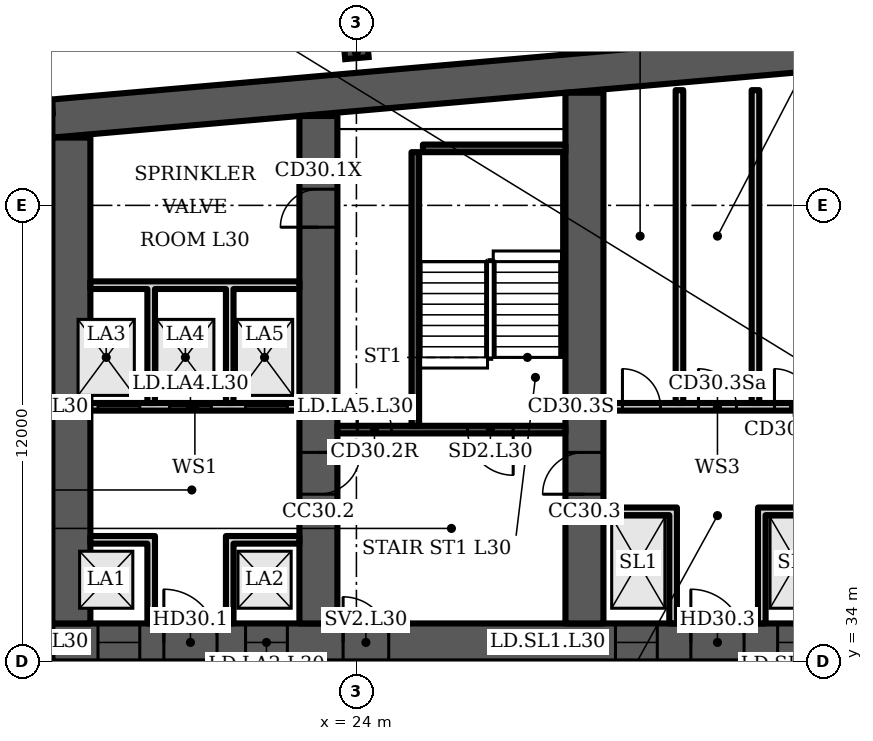
"""IFC4 building model, lengths in metres.
Left out: names, types, materials, properties, quantities, classifications, styles, units other than length and angle.
Written with IfcOpenShell. Run it as: python <this file> out.ifc"""

import sys

from ifc_helpers import new_model, si_unit, direction, frame, frame_2d, origin, origin_2d, place, context, subcontext, project, spatial, polyline, rectangle, i_section, outline, extrude, element, fill, save


model = new_model("IFC4")
c1 = context("Model", 3, precision=1e-05, world=origin(), true_north=direction((0.0, 1.0)))
c2 = subcontext(c1, "Body", "Model", "MODEL_VIEW")
j1 = project(units=[si_unit("LENGTHUNIT", "METRE"), si_unit("PLANEANGLEUNIT", "RADIAN")], contexts=[c1])
p1 = place(None, origin())
s1 = spatial("IfcSite", under=j1, at=p1, CompositionType="ELEMENT")
p2 = place(p1, origin())
s2 = spatial("IfcBuilding", under=s1, at=p2, CompositionType="ELEMENT")
p3 = place(p2, frame((0.0, 0.0, 129.1)))
s3 = spatial("IfcBuildingStorey", under=s2, at=p3, CompositionType="ELEMENT", Elevation=129.1)
p4 = place(p3, frame((0.0, 0.0, -0.0)))
e1 = element("IfcWall", 1, at=p4, inside=s3, PredefinedType="SHEAR", context=c2, shape_type="SweptSolid", body=[
    extrude(outline(polyline([(16.0, 47.784), (40.5, 49.927), (65.0, 47.784), (65.0, 48.787), (40.5, 50.931), (16.0, 48.787), (16.0, 47.784)])), origin(), (0.0, 0.0, 1.0), 3.6),
])
p5 = place(p3, frame((16.0, 34.5, 0.0), z_axis=(0.0, 0.0, 1.0), x_axis=(1.0, 0.0, 0.0)))
e2 = element("IfcWall", 2, at=p5, inside=s3, PredefinedType="SHEAR", context=c2, shape_type="SweptSolid", body=[
    extrude(rectangle(XDim=49.0, YDim=1.0, at=frame_2d((24.5, 0.0))), origin(), (0.0, 0.0, 1.0), 3.6),
])
p6 = place(p5, frame((1.2, 0.0, 0.0)))
e3 = element("IfcOpeningElement", 3, at=p6, cuts=e2, PredefinedType="OPENING", context=c2, shape_type="SweptSolid", body=[
    extrude(rectangle(XDim=1.1, YDim=2.1, at=frame_2d((0.55, 1.05))), frame((0.0, 0.51, 0.0), z_axis=(0.0, -1.0, 0.0), x_axis=(1.0, 0.0, 0.0)), (0.0, 0.0, 1.0), 1.02),
])
p7 = place(p5, frame((5.083, 0.0, 0.0)))
e4 = element("IfcOpeningElement", 4, at=p7, cuts=e2, PredefinedType="OPENING", context=c2, shape_type="SweptSolid", body=[
    extrude(rectangle(XDim=1.1, YDim=2.1, at=frame_2d((0.55, 1.05))), frame((0.0, 0.51, 0.0), z_axis=(0.0, -1.0, 0.0), x_axis=(1.0, 0.0, 0.0)), (0.0, 0.0, 1.0), 1.02),
])
p8 = place(p5, frame((2.933, 0.0, 0.0)))
e5 = element("IfcOpeningElement", 5, at=p8, cuts=e2, PredefinedType="OPENING", context=c2, shape_type="SweptSolid", body=[
    extrude(rectangle(XDim=1.4, YDim=2.1, at=frame_2d((0.7, 1.05))), frame((0.0, 0.51, 0.0), z_axis=(0.0, -1.0, 0.0), x_axis=(1.0, 0.0, 0.0)), (0.0, 0.0, 1.0), 1.02),
])
p9 = place(p5, frame((7.65, 0.0, 0.0)))
e6 = element("IfcOpeningElement", 6, at=p9, cuts=e2, PredefinedType="OPENING", context=c2, shape_type="SweptSolid", body=[
    extrude(rectangle(XDim=1.2, YDim=2.1, at=frame_2d((0.6, 1.05))), frame((0.0, 0.51, 0.0), z_axis=(0.0, -1.0, 0.0), x_axis=(1.0, 0.0, 0.0)), (0.0, 0.0, 1.0), 1.02),
])
p10 = place(p5, frame((14.817, 0.0, 0.0)))
e7 = element("IfcOpeningElement", 7, at=p10, cuts=e2, PredefinedType="OPENING", context=c2, shape_type="SweptSolid", body=[
    extrude(rectangle(XDim=1.1, YDim=2.1, at=frame_2d((0.55, 1.05))), frame((0.0, 0.51, 0.0), z_axis=(0.0, -1.0, 0.0), x_axis=(1.0, 0.0, 0.0)), (0.0, 0.0, 1.0), 1.02),
])
p11 = place(p5, frame((19.083, 0.0, 0.0)))
e8 = element("IfcOpeningElement", 8, at=p11, cuts=e2, PredefinedType="OPENING", context=c2, shape_type="SweptSolid", body=[
    extrude(rectangle(XDim=1.1, YDim=2.1, at=frame_2d((0.55, 1.05))), frame((0.0, 0.51, 0.0), z_axis=(0.0, -1.0, 0.0), x_axis=(1.0, 0.0, 0.0)), (0.0, 0.0, 1.0), 1.02),
])
p12 = place(p5, frame((16.8, 0.0, 0.0)))
e9 = element("IfcOpeningElement", 9, at=p12, cuts=e2, PredefinedType="OPENING", context=c2, shape_type="SweptSolid", body=[
    extrude(rectangle(XDim=1.4, YDim=2.1, at=frame_2d((0.7, 1.05))), frame((0.0, 0.51, 0.0), z_axis=(0.0, -1.0, 0.0), x_axis=(1.0, 0.0, 0.0)), (0.0, 0.0, 1.0), 1.02),
])
p13 = place(p5, frame((21.817, 0.0, 0.0)))
e10 = element("IfcOpeningElement", 10, at=p13, cuts=e2, PredefinedType="OPENING", context=c2, shape_type="SweptSolid", body=[
    extrude(rectangle(XDim=1.1, YDim=2.1, at=frame_2d((0.55, 1.05))), frame((0.0, 0.51, 0.0), z_axis=(0.0, -1.0, 0.0), x_axis=(1.0, 0.0, 0.0)), (0.0, 0.0, 1.0), 1.02),
])
p14 = place(p5, frame((26.083, 0.0, 0.0)))
e11 = element("IfcOpeningElement", 11, at=p14, cuts=e2, PredefinedType="OPENING", context=c2, shape_type="SweptSolid", body=[
    extrude(rectangle(XDim=1.1, YDim=2.1, at=frame_2d((0.55, 1.05))), frame((0.0, 0.51, 0.0), z_axis=(0.0, -1.0, 0.0), x_axis=(1.0, 0.0, 0.0)), (0.0, 0.0, 1.0), 1.02),
])
p15 = place(p5, frame((33.15, 0.0, 0.0)))
e12 = element("IfcOpeningElement", 12, at=p15, cuts=e2, PredefinedType="OPENING", context=c2, shape_type="SweptSolid", body=[
    extrude(rectangle(XDim=1.2, YDim=2.1, at=frame_2d((0.6, 1.05))), frame((0.0, 0.51, 0.0), z_axis=(0.0, -1.0, 0.0), x_axis=(1.0, 0.0, 0.0)), (0.0, 0.0, 1.0), 1.02),
])
p16 = place(p5, frame((37.8, 0.0, 0.0)))
e13 = element("IfcOpeningElement", 13, at=p16, cuts=e2, PredefinedType="OPENING", context=c2, shape_type="SweptSolid", body=[
    extrude(rectangle(XDim=1.4, YDim=2.1, at=frame_2d((0.7, 1.05))), frame((0.0, 0.51, 0.0), z_axis=(0.0, -1.0, 0.0), x_axis=(1.0, 0.0, 0.0)), (0.0, 0.0, 1.0), 1.02),
])
p17 = place(p5, frame((42.817, 0.0, 0.0)))
e14 = element("IfcOpeningElement", 14, at=p17, cuts=e2, PredefinedType="OPENING", context=c2, shape_type="SweptSolid", body=[
    extrude(rectangle(XDim=1.1, YDim=2.1, at=frame_2d((0.55, 1.05))), frame((0.0, 0.51, 0.0), z_axis=(0.0, -1.0, 0.0), x_axis=(1.0, 0.0, 0.0)), (0.0, 0.0, 1.0), 1.02),
])
p18 = place(p5, frame((46.7, 0.0, 0.0)))
e15 = element("IfcOpeningElement", 15, at=p18, cuts=e2, PredefinedType="OPENING", context=c2, shape_type="SweptSolid", body=[
    extrude(rectangle(XDim=1.1, YDim=2.1, at=frame_2d((0.55, 1.05))), frame((0.0, 0.51, 0.0), z_axis=(0.0, -1.0, 0.0), x_axis=(1.0, 0.0, 0.0)), (0.0, 0.0, 1.0), 1.02),
])
p19 = place(p5, frame((44.667, 0.0, 0.0)))
e16 = element("IfcOpeningElement", 16, at=p19, cuts=e2, PredefinedType="OPENING", context=c2, shape_type="SweptSolid", body=[
    extrude(rectangle(XDim=1.4, YDim=2.1, at=frame_2d((0.7, 1.05))), frame((0.0, 0.51, 0.0), z_axis=(0.0, -1.0, 0.0), x_axis=(1.0, 0.0, 0.0)), (0.0, 0.0, 1.0), 1.02),
])
p20 = place(p3, frame((16.5, 35.0, 0.0), z_axis=(0.0, 0.0, 1.0), x_axis=(0.0, 1.0, 0.0)))
e17 = element("IfcWall", 17, at=p20, inside=s3, PredefinedType="SHEAR", context=c2, shape_type="SweptSolid", body=[
    extrude(rectangle(XDim=12.784, YDim=1.0, at=frame_2d((6.392, 0.0))), origin(), (0.0, 0.0, 1.0), 3.6),
])
p21 = place(p3, frame((23.0, 35.0, 0.0), z_axis=(0.0, 0.0, 1.0), x_axis=(0.0, 1.0, 0.0)))
e18 = element("IfcWall", 18, at=p21, inside=s3, PredefinedType="SHEAR", context=c2, shape_type="SweptSolid", body=[
    extrude(rectangle(XDim=13.352, YDim=1.0, at=frame_2d((6.676, 0.0))), origin(), (0.0, 0.0, 1.0), 3.6),
])
p22 = place(p21, frame((10.426, 0.0, 0.0)))
e19 = element("IfcOpeningElement", 19, at=p22, cuts=e18, PredefinedType="OPENING", context=c2, shape_type="SweptSolid", body=[
    extrude(rectangle(XDim=1.0, YDim=2.1, at=frame_2d((0.5, 1.05))), frame((0.0, 0.51, 0.0), z_axis=(0.0, -1.0, 0.0), x_axis=(1.0, 0.0, 0.0)), (0.0, 0.0, 1.0), 1.02),
])
p23 = place(p21, frame((3.4, 0.0, 0.0)))
e20 = element("IfcOpeningElement", 20, at=p23, cuts=e18, PredefinedType="OPENING", context=c2, shape_type="SweptSolid", body=[
    extrude(rectangle(XDim=1.1, YDim=2.1, at=frame_2d((0.55, 1.05))), frame((0.0, 0.51, 0.0), z_axis=(0.0, -1.0, 0.0), x_axis=(1.0, 0.0, 0.0)), (0.0, 0.0, 1.0), 1.02),
])
p24 = place(p3, frame((30.0, 35.0, 0.0), z_axis=(0.0, 0.0, 1.0), x_axis=(0.0, 1.0, 0.0)))
e21 = element("IfcWall", 21, at=p24, inside=s3, PredefinedType="SHEAR", context=c2, shape_type="SweptSolid", body=[
    extrude(rectangle(XDim=13.965, YDim=1.0, at=frame_2d((6.982, 0.0))), origin(), (0.0, 0.0, 1.0), 3.6),
])
p25 = place(p24, frame((3.4, 0.0, 0.0)))
e22 = element("IfcOpeningElement", 22, at=p25, cuts=e21, PredefinedType="OPENING", context=c2, shape_type="SweptSolid", body=[
    extrude(rectangle(XDim=1.1, YDim=2.1, at=frame_2d((0.55, 1.05))), frame((0.0, 0.51, 0.0), z_axis=(0.0, -1.0, 0.0), x_axis=(1.0, 0.0, 0.0)), (0.0, 0.0, 1.0), 1.02),
])
p26 = place(p3, frame((24.0, 50.027, 0.0), z_axis=(0.0, 0.0, 1.0), x_axis=(-0.087156, 0.996198, 0.0)))
e23 = element("IfcColumn", 23, at=p26, inside=s3, PredefinedType="COLUMN", context=c2, shape_type="SweptSolid", body=[
    extrude(i_section(OverallWidth=0.305, OverallDepth=0.62, WebThickness=0.021, FlangeThickness=0.04, FilletRadius=0.027, at=origin_2d()), origin(), (0.0, 0.0, 1.0), 3.6),
])
p27 = place(p3, frame((16.0, 48.587, 0.0), z_axis=(0.0, 0.0, 1.0), x_axis=(-0.996194, -0.087168, 0.0)))
e24 = element("IfcWall", 24, at=p27, inside=s3, PredefinedType="SOLIDWALL", context=c2, shape_type="SweptSolid", body=[
    extrude(rectangle(XDim=2.994, YDim=0.4, at=frame_2d((1.497, 0.0))), origin(), (0.0, 0.0, 1.0), 3.2),
])
p28 = place(p3, frame((17.0, 40.7, 0.0), z_axis=(0.0, 0.0, 1.0), x_axis=(1.0, 0.0, 0.0)))
e25 = element("IfcWall", 25, at=p28, inside=s3, PredefinedType="PARTITIONING", context=c2, shape_type="SweptSolid", body=[
    extrude(rectangle(XDim=5.5, YDim=0.2, at=frame_2d((2.75, 0.0))), origin(), (0.0, 0.0, 1.0), 3.2),
])
p29 = place(p28, frame((0.2, 0.0, 0.0)))
e26 = element("IfcOpeningElement", 26, at=p29, cuts=e25, PredefinedType="OPENING", context=c2, shape_type="SweptSolid", body=[
    extrude(rectangle(XDim=1.1, YDim=2.1, at=frame_2d((0.55, 1.05))), frame((0.0, 0.11, 0.0), z_axis=(0.0, -1.0, 0.0), x_axis=(1.0, 0.0, 0.0)), (0.0, 0.0, 1.0), 0.22),
])
p30 = place(p28, frame((2.083, 0.0, 0.0)))
e27 = element("IfcOpeningElement", 27, at=p30, cuts=e25, PredefinedType="OPENING", context=c2, shape_type="SweptSolid", body=[
    extrude(rectangle(XDim=1.1, YDim=2.1, at=frame_2d((0.55, 1.05))), frame((0.0, 0.11, 0.0), z_axis=(0.0, -1.0, 0.0), x_axis=(1.0, 0.0, 0.0)), (0.0, 0.0, 1.0), 0.22),
])
p31 = place(p28, frame((4.083, 0.0, 0.0)))
e28 = element("IfcOpeningElement", 28, at=p31, cuts=e25, PredefinedType="OPENING", context=c2, shape_type="SweptSolid", body=[
    extrude(rectangle(XDim=1.1, YDim=2.1, at=frame_2d((0.55, 1.05))), frame((0.0, 0.11, 0.0), z_axis=(0.0, -1.0, 0.0), x_axis=(1.0, 0.0, 0.0)), (0.0, 0.0, 1.0), 0.22),
])
p32 = place(p3, frame((0.0, 0.0, -0.0)))
e29 = element("IfcWall", 29, at=p32, inside=s3, PredefinedType="PARTITIONING", context=c2, shape_type="SweptSolid", body=[
    extrude(outline(polyline([(18.5, 37.1), (17.0, 37.1), (17.0, 37.3), (18.5, 37.3), (18.7, 37.3), (18.7, 35.0), (18.5, 35.0), (18.5, 37.1)])), origin(), (0.0, 0.0, 1.0), 3.2),
])
p33 = place(p3, frame((0.0, 0.0, -0.0)))
e30 = element("IfcWall", 30, at=p33, inside=s3, PredefinedType="PARTITIONING", context=c2, shape_type="SweptSolid", body=[
    extrude(outline(polyline([(20.567, 37.3), (20.767, 37.3), (22.5, 37.3), (22.5, 37.1), (20.767, 37.1), (20.767, 35.0), (20.567, 35.0), (20.567, 37.3)])), origin(), (0.0, 0.0, 1.0), 3.2),
])
p34 = place(p3, frame((0.0, 0.0, -0.0)))
e31 = element("IfcWall", 31, at=p34, inside=s3, PredefinedType="PARTITIONING", context=c2, shape_type="SweptSolid", body=[
    extrude(outline(polyline([(18.7, 40.8), (18.5, 40.8), (18.5, 43.8), (17.0, 43.8), (17.0, 44.0), (22.5, 44.0), (22.5, 43.8), (20.767, 43.8), (20.767, 40.8), (20.567, 40.8), (20.567, 43.8), (18.7, 43.8), (18.7, 40.8)])), origin(), (0.0, 0.0, 1.0), 3.2),
])
p35 = place(p3, frame((23.5, 40.1, 0.0), z_axis=(0.0, 0.0, 1.0), x_axis=(1.0, 0.0, 0.0)))
e32 = element("IfcWall", 32, at=p35, inside=s3, PredefinedType="SHEAR", context=c2, shape_type="SweptSolid", body=[
    extrude(rectangle(XDim=6.0, YDim=0.2, at=frame_2d((3.0, 0.0))), origin(), (0.0, 0.0, 1.0), 3.2),
])
p36 = place(p35, frame((3.425, 0.0, 0.0)))
e33 = element("IfcOpeningElement", 33, at=p36, cuts=e32, PredefinedType="OPENING", context=c2, shape_type="SweptSolid", body=[
    extrude(rectangle(XDim=1.2, YDim=2.1, at=frame_2d((0.6, 1.05))), frame((0.0, 0.11, 0.0), z_axis=(0.0, -1.0, 0.0), x_axis=(1.0, 0.0, 0.0)), (0.0, 0.0, 1.0), 0.22),
])
p37 = place(p35, frame((0.525, 0.0, 0.0)))
e34 = element("IfcOpeningElement", 34, at=p37, cuts=e32, PredefinedType="OPENING", context=c2, shape_type="SweptSolid", body=[
    extrude(rectangle(XDim=0.9, YDim=2.1, at=frame_2d((0.45, 1.05))), frame((0.0, 0.11, 0.0), z_axis=(0.0, -1.0, 0.0), x_axis=(1.0, 0.0, 0.0)), (0.0, 0.0, 1.0), 0.22),
])
p38 = place(p3, frame((25.55, 40.2, 0.0), z_axis=(0.0, 0.0, 1.0), x_axis=(0.0, 1.0, 0.0)))
e35 = element("IfcWall", 35, at=p38, inside=s3, PredefinedType="SHEAR", context=c2, shape_type="SweptSolid", body=[
    extrude(rectangle(XDim=7.2, YDim=0.2, at=frame_2d((3.6, 0.0))), origin(), (0.0, 0.0, 1.0), 3.2),
])
p39 = place(p3, frame((25.75, 47.5, 0.0), z_axis=(0.0, 0.0, 1.0), x_axis=(1.0, 0.0, 0.0)))
e36 = element("IfcWall", 36, at=p39, inside=s3, PredefinedType="SHEAR", context=c2, shape_type="SweptSolid", body=[
    extrude(rectangle(XDim=3.75, YDim=0.2, at=frame_2d((1.875, 0.0))), origin(), (0.0, 0.0, 1.0), 3.2),
])
p40 = place(p3, frame((30.5, 40.7, 0.0), z_axis=(0.0, 0.0, 1.0), x_axis=(1.0, 0.0, 0.0)))
e37 = element("IfcWall", 37, at=p40, inside=s3, PredefinedType="PARTITIONING", context=c2, shape_type="SweptSolid", body=[
    extrude(rectangle(XDim=6.0, YDim=0.2, at=frame_2d((3.0, 0.0))), origin(), (0.0, 0.0, 1.0), 3.2),
])
p41 = place(p40, frame((0.5, 0.0, 0.0)))
e38 = element("IfcOpeningElement", 38, at=p41, cuts=e37, PredefinedType="OPENING", context=c2, shape_type="SweptSolid", body=[
    extrude(rectangle(XDim=1.0, YDim=2.1, at=frame_2d((0.5, 1.05))), frame((0.0, 0.11, 0.0), z_axis=(0.0, -1.0, 0.0), x_axis=(1.0, 0.0, 0.0)), (0.0, 0.0, 1.0), 0.22),
])
p42 = place(p40, frame((2.5, 0.0, 0.0)))
e39 = element("IfcOpeningElement", 39, at=p42, cuts=e37, PredefinedType="OPENING", context=c2, shape_type="SweptSolid", body=[
    extrude(rectangle(XDim=1.0, YDim=2.1, at=frame_2d((0.5, 1.05))), frame((0.0, 0.11, 0.0), z_axis=(0.0, -1.0, 0.0), x_axis=(1.0, 0.0, 0.0)), (0.0, 0.0, 1.0), 0.22),
])
p43 = place(p40, frame((4.5, 0.0, 0.0)))
e40 = element("IfcOpeningElement", 40, at=p43, cuts=e37, PredefinedType="OPENING", context=c2, shape_type="SweptSolid", body=[
    extrude(rectangle(XDim=1.0, YDim=2.1, at=frame_2d((0.5, 1.05))), frame((0.0, 0.11, 0.0), z_axis=(0.0, -1.0, 0.0), x_axis=(1.0, 0.0, 0.0)), (0.0, 0.0, 1.0), 0.22),
])
p44 = place(p3, frame((0.0, 0.0, -0.0)))
e41 = element("IfcWall", 41, at=p44, inside=s3, PredefinedType="PARTITIONING", context=c2, shape_type="SweptSolid", body=[
    extrude(outline(polyline([(32.233, 37.85), (30.5, 37.85), (30.5, 38.05), (32.233, 38.05), (32.433, 38.05), (32.433, 35.0), (32.233, 35.0), (32.233, 37.85)])), origin(), (0.0, 0.0, 1.0), 3.2),
])
p45 = place(p3, frame((0.0, 0.0, -0.0)))
e42 = element("IfcWall", 42, at=p45, inside=s3, PredefinedType="PARTITIONING", context=c2, shape_type="SweptSolid", body=[
    extrude(outline(polyline([(34.567, 38.05), (34.767, 38.05), (36.5, 38.05), (36.5, 37.85), (34.767, 37.85), (34.767, 35.0), (34.567, 35.0), (34.567, 38.05)])), origin(), (0.0, 0.0, 1.0), 3.2),
])
for number, where, z_axis, x_axis in (
    (43, (32.5, 40.8, 0.0), (0.0, 0.0, 1.0), (0.0, 1.0, 0.0)),
    (44, (34.5, 40.8, 0.0), (0.0, 0.0, 1.0), (0.0, 1.0, 0.0)),
):
    element("IfcWall", number, at=place(p3, frame(where, z_axis=z_axis, x_axis=x_axis)), inside=s3, PredefinedType="PARTITIONING", context=c2, shape_type="SweptSolid", body=[
        extrude(rectangle(XDim=8.232, YDim=0.2, at=frame_2d((4.116, 0.0))), origin(), (0.0, 0.0, 1.0), 3.2),
    ])
p46 = place(p6, origin())
e45 = element("IfcDoor", 45, at=p46, inside=s3, OperationType="DOUBLE_DOOR_SLIDING", PredefinedType="DOOR", context=c2, shape_type="SweptSolid", body=[
    extrude(rectangle(XDim=1.1, YDim=2.1, at=frame_2d((0.55, 1.05))), frame((0.0, 0.025, 0.0), z_axis=(0.0, -1.0, 0.0), x_axis=(1.0, 0.0, 0.0)), (0.0, 0.0, 1.0), 0.05),
])
fill(e3, e45)
p47 = place(p7, origin())
e46 = element("IfcDoor", 46, at=p47, inside=s3, OperationType="DOUBLE_DOOR_SLIDING", PredefinedType="DOOR", context=c2, shape_type="SweptSolid", body=[
    extrude(rectangle(XDim=1.1, YDim=2.1, at=frame_2d((0.55, 1.05))), frame((0.0, 0.025, 0.0), z_axis=(0.0, -1.0, 0.0), x_axis=(1.0, 0.0, 0.0)), (0.0, 0.0, 1.0), 0.05),
])
fill(e4, e46)
p48 = place(p8, origin())
e47 = element("IfcDoor", 47, at=p48, inside=s3, OperationType="DOUBLE_DOOR_SINGLE_SWING", PredefinedType="DOOR", context=c2, shape_type="SweptSolid", body=[
    extrude(rectangle(XDim=1.4, YDim=2.1, at=frame_2d((0.7, 1.05))), frame((0.0, 0.025, 0.0), z_axis=(0.0, -1.0, 0.0), x_axis=(1.0, 0.0, 0.0)), (0.0, 0.0, 1.0), 0.05),
])
fill(e5, e47)
p49 = place(p29, origin())
e48 = element("IfcDoor", 48, at=p49, inside=s3, OperationType="DOUBLE_DOOR_SLIDING", PredefinedType="DOOR", context=c2, shape_type="SweptSolid", body=[
    extrude(rectangle(XDim=1.1, YDim=2.1, at=frame_2d((0.55, 1.05))), frame((0.0, 0.025, 0.0), z_axis=(0.0, -1.0, 0.0), x_axis=(1.0, 0.0, 0.0)), (0.0, 0.0, 1.0), 0.05),
])
fill(e26, e48)
p50 = place(p30, origin())
e49 = element("IfcDoor", 49, at=p50, inside=s3, OperationType="DOUBLE_DOOR_SLIDING", PredefinedType="DOOR", context=c2, shape_type="SweptSolid", body=[
    extrude(rectangle(XDim=1.1, YDim=2.1, at=frame_2d((0.55, 1.05))), frame((0.0, 0.025, 0.0), z_axis=(0.0, -1.0, 0.0), x_axis=(1.0, 0.0, 0.0)), (0.0, 0.0, 1.0), 0.05),
])
fill(e27, e49)
p51 = place(p31, origin())
e50 = element("IfcDoor", 50, at=p51, inside=s3, OperationType="DOUBLE_DOOR_SLIDING", PredefinedType="DOOR", context=c2, shape_type="SweptSolid", body=[
    extrude(rectangle(XDim=1.1, YDim=2.1, at=frame_2d((0.55, 1.05))), frame((0.0, 0.025, 0.0), z_axis=(0.0, -1.0, 0.0), x_axis=(1.0, 0.0, 0.0)), (0.0, 0.0, 1.0), 0.05),
])
fill(e28, e50)
p52 = place(p22, origin())
e51 = element("IfcDoor", 51, at=p52, inside=s3, OperationType="SINGLE_SWING_LEFT", PredefinedType="DOOR", context=c2, shape_type="SweptSolid", body=[
    extrude(rectangle(XDim=1.0, YDim=2.1, at=frame_2d((0.5, 1.05))), frame((0.0, 0.5, 0.0), z_axis=(0.0, -1.0, 0.0), x_axis=(1.0, 0.0, 0.0)), (0.0, 0.0, 1.0), 1.0),
])
fill(e19, e51)
p53 = place(p36, origin())
e52 = element("IfcDoor", 52, at=p53, inside=s3, OperationType="SINGLE_SWING_RIGHT", PredefinedType="DOOR", context=c2, shape_type="SweptSolid", body=[
    extrude(rectangle(XDim=1.2, YDim=2.1, at=frame_2d((0.6, 1.05))), frame((0.0, 0.025, 0.0), z_axis=(0.0, -1.0, 0.0), x_axis=(1.0, 0.0, 0.0)), (0.0, 0.0, 1.0), 0.05),
])
fill(e33, e52)
p54 = place(p37, origin())
e53 = element("IfcDoor", 53, at=p54, inside=s3, OperationType="SINGLE_SWING_LEFT", PredefinedType="DOOR", context=c2, shape_type="SweptSolid", body=[
    extrude(rectangle(XDim=0.9, YDim=2.1, at=frame_2d((0.45, 1.05))), frame((0.0, 0.025, 0.0), z_axis=(0.0, -1.0, 0.0), x_axis=(1.0, 0.0, 0.0)), (0.0, 0.0, 1.0), 0.05),
])
fill(e34, e53)
p55 = place(p9, origin())
e54 = element("IfcDoor", 54, at=p55, inside=s3, OperationType="SINGLE_SWING_LEFT", PredefinedType="DOOR", context=c2, shape_type="SweptSolid", body=[
    extrude(rectangle(XDim=1.2, YDim=2.1, at=frame_2d((0.6, 1.05))), frame((0.0, 0.025, 0.0), z_axis=(0.0, -1.0, 0.0), x_axis=(1.0, 0.0, 0.0)), (0.0, 0.0, 1.0), 0.05),
])
fill(e6, e54)
p56 = place(p10, origin())
e55 = element("IfcDoor", 55, at=p56, inside=s3, OperationType="DOUBLE_DOOR_SLIDING", PredefinedType="DOOR", context=c2, shape_type="SweptSolid", body=[
    extrude(rectangle(XDim=1.1, YDim=2.1, at=frame_2d((0.55, 1.05))), frame((0.0, 0.025, 0.0), z_axis=(0.0, -1.0, 0.0), x_axis=(1.0, 0.0, 0.0)), (0.0, 0.0, 1.0), 0.05),
])
fill(e7, e55)
p57 = place(p11, origin())
e56 = element("IfcDoor", 56, at=p57, inside=s3, OperationType="DOUBLE_DOOR_SLIDING", PredefinedType="DOOR", context=c2, shape_type="SweptSolid", body=[
    extrude(rectangle(XDim=1.1, YDim=2.1, at=frame_2d((0.55, 1.05))), frame((0.0, 0.025, 0.0), z_axis=(0.0, -1.0, 0.0), x_axis=(1.0, 0.0, 0.0)), (0.0, 0.0, 1.0), 0.05),
])
fill(e8, e56)
p58 = place(p12, origin())
e57 = element("IfcDoor", 57, at=p58, inside=s3, OperationType="DOUBLE_DOOR_SINGLE_SWING", PredefinedType="DOOR", context=c2, shape_type="SweptSolid", body=[
    extrude(rectangle(XDim=1.4, YDim=2.1, at=frame_2d((0.7, 1.05))), frame((0.0, 0.025, 0.0), z_axis=(0.0, -1.0, 0.0), x_axis=(1.0, 0.0, 0.0)), (0.0, 0.0, 1.0), 0.05),
])
fill(e9, e57)
p59 = place(p41, origin())
e58 = element("IfcDoor", 58, at=p59, inside=s3, OperationType="SINGLE_SWING_LEFT", PredefinedType="DOOR", context=c2, shape_type="SweptSolid", body=[
    extrude(rectangle(XDim=1.0, YDim=2.1, at=frame_2d((0.5, 1.05))), frame((0.0, 0.025, 0.0), z_axis=(0.0, -1.0, 0.0), x_axis=(1.0, 0.0, 0.0)), (0.0, 0.0, 1.0), 0.05),
])
fill(e38, e58)
p60 = place(p42, origin())
e59 = element("IfcDoor", 59, at=p60, inside=s3, OperationType="SINGLE_SWING_LEFT", PredefinedType="DOOR", context=c2, shape_type="SweptSolid", body=[
    extrude(rectangle(XDim=1.0, YDim=2.1, at=frame_2d((0.5, 1.05))), frame((0.0, 0.025, 0.0), z_axis=(0.0, -1.0, 0.0), x_axis=(1.0, 0.0, 0.0)), (0.0, 0.0, 1.0), 0.05),
])
fill(e39, e59)
p61 = place(p43, origin())
e60 = element("IfcDoor", 60, at=p61, inside=s3, OperationType="SINGLE_SWING_LEFT", PredefinedType="DOOR", context=c2, shape_type="SweptSolid", body=[
    extrude(rectangle(XDim=1.0, YDim=2.1, at=frame_2d((0.5, 1.05))), frame((0.0, 0.025, 0.0), z_axis=(0.0, -1.0, 0.0), x_axis=(1.0, 0.0, 0.0)), (0.0, 0.0, 1.0), 0.05),
])
fill(e40, e60)
p62 = place(p23, origin())
e61 = element("IfcDoor", 61, at=p62, inside=s3, OperationType="SINGLE_SWING_RIGHT", PredefinedType="DOOR", context=c2, shape_type="SweptSolid", body=[
    extrude(rectangle(XDim=1.1, YDim=2.1, at=frame_2d((0.55, 1.05))), frame((0.0, 0.025, 0.0), z_axis=(0.0, -1.0, 0.0), x_axis=(1.0, 0.0, 0.0)), (0.0, 0.0, 1.0), 0.05),
])
fill(e20, e61)
p63 = place(p25, origin())
e62 = element("IfcDoor", 62, at=p63, inside=s3, OperationType="SINGLE_SWING_LEFT", PredefinedType="DOOR", context=c2, shape_type="SweptSolid", body=[
    extrude(rectangle(XDim=1.1, YDim=2.1, at=frame_2d((0.55, 1.05))), frame((0.0, 0.025, 0.0), z_axis=(0.0, -1.0, 0.0), x_axis=(1.0, 0.0, 0.0)), (0.0, 0.0, 1.0), 0.05),
])
fill(e22, e62)
save(model, sys.argv[1])
